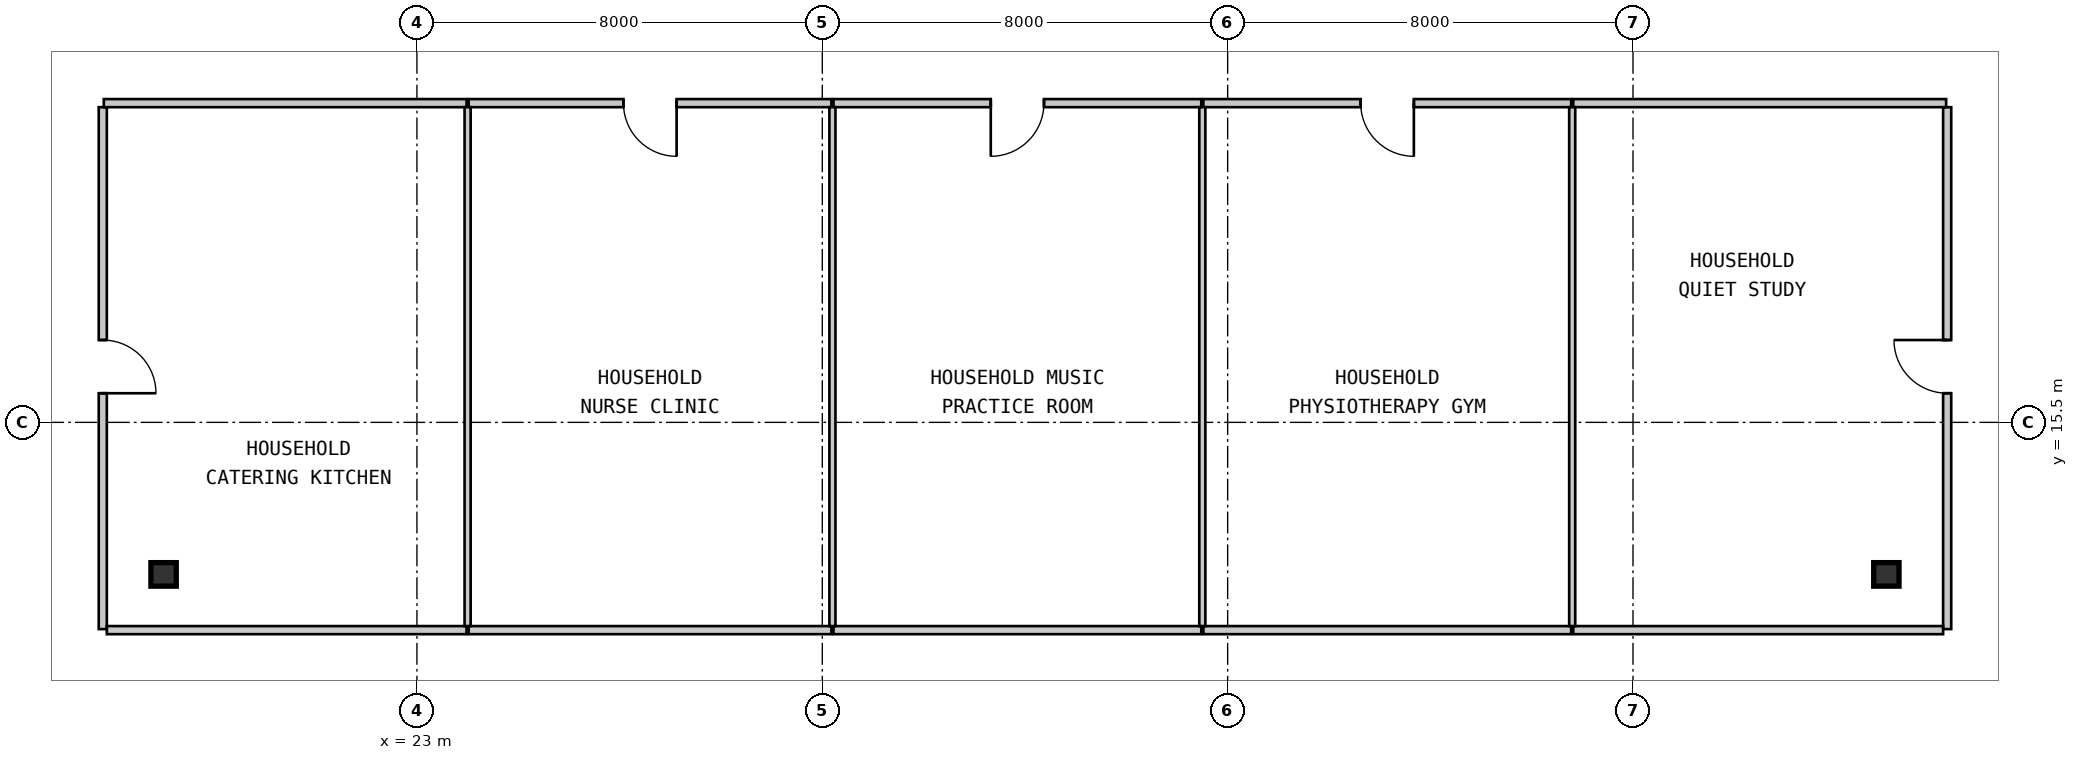
"""IFC4 building model, lengths in metres.
Left out: names, types, materials, properties, quantities, classifications, styles, units other than length and angle.
Written with IfcOpenShell. Run it as: python <this file> out.ifc"""

import sys

from ifc_helpers import new_model, si_unit, direction, frame, frame_2d, origin, origin_2d, place, context, subcontext, project, spatial, rectangle, i_section, extrude, source, transform, mapped, element, fill, save


model = new_model("IFC4")
c1 = context("Model", 3, precision=1e-05, world=origin(), true_north=direction((0.0, 1.0)))
c2 = subcontext(c1, "Body", "Model", "MODEL_VIEW")
j1 = project(units=[si_unit("LENGTHUNIT", "METRE"), si_unit("PLANEANGLEUNIT", "RADIAN")], contexts=[c1])
p1 = place(None, origin())
s1 = spatial("IfcSite", under=j1, at=p1, CompositionType="ELEMENT")
p2 = place(p1, origin())
s2 = spatial("IfcBuilding", under=s1, at=p2, CompositionType="ELEMENT")
p3 = place(p2, frame((0.0, 0.0, 93.45)))
s3 = spatial("IfcBuildingStorey", under=s2, at=p3, CompositionType="ELEMENT", Elevation=93.45)
m1 = source(origin(), c2, "Body", "SweptSolid", [
    extrude(i_section(OverallWidth=0.5, OverallDepth=0.464, WebThickness=0.022, FlangeThickness=0.034, at=origin_2d()), origin(), (0.0, 0.0, 1.0), 3.15),
])
for number, where, z_axis, x_axis in (
    (1, (18.0, 12.5, 0.0), (0.0, 0.0, 1.0), (1.0, 0.0, 0.0)),
    (2, (52.0, 12.5, 0.0), (0.0, 0.0, 1.0), (1.0, 0.0, 0.0)),
):
    element("IfcColumn", number, at=place(p3, frame(where, z_axis=z_axis, x_axis=x_axis)), inside=s3, PredefinedType="COLUMN", context=c2, shape_type="MappedRepresentation", body=[
        mapped(m1, transform((0.0, 0.0, 0.0), scale=1.0)),
    ])
m2 = source(origin(), c2, "Body", "SweptSolid", [
    extrude(rectangle(XDim=10.3, YDim=0.16, at=frame_2d((5.15, 0.0))), origin(), (0.0, 0.0, 1.0), 2.93),
])
p4 = place(p3, frame((16.8, 21.72, 0.0), z_axis=(0.0, 0.0, 1.0), x_axis=(0.0, -1.0, 0.0)))
e3 = element("IfcWall", 3, at=p4, inside=s3, PredefinedType="PARTITIONING", context=c2, shape_type="MappedRepresentation", body=[
    mapped(m2, transform((0.0, 0.0, 0.0), scale=1.0)),
])
m3 = source(origin(), c2, "Body", "SweptSolid", [
    extrude(rectangle(XDim=1.05, YDim=2.1, at=frame_2d((0.525, 1.05))), frame((0.0, 0.09, 0.0), z_axis=(0.0, -1.0, 0.0), x_axis=(1.0, 0.0, 0.0)), (0.0, 0.0, 1.0), 0.18),
])
p5 = place(p4, frame((4.595, 0.0, 0.0)))
e4 = element("IfcOpeningElement", 4, at=p5, cuts=e3, PredefinedType="OPENING", context=c2, shape_type="MappedRepresentation", body=[
    mapped(m3, transform((0.0, 0.0, 0.0), scale=1.0)),
])
m4 = source(origin(), c2, "Body", "SweptSolid", [
    extrude(rectangle(XDim=7.159, YDim=0.16, at=frame_2d((3.58, 0.0))), origin(), (0.0, 0.0, 1.0), 2.93),
])
p6 = place(p3, frame((23.98, 21.8, 0.0), z_axis=(0.0, 0.0, 1.0), x_axis=(-1.0, 0.0, 0.0)))
e5 = element("IfcWall", 5, at=p6, inside=s3, PredefinedType="PARTITIONING", context=c2, shape_type="MappedRepresentation", body=[
    mapped(m4, transform((0.0, 0.0, 0.0), scale=1.0)),
])
p7 = place(p3, frame((31.18, 21.8, 0.0), z_axis=(0.0, 0.0, 1.0), x_axis=(-1.0, 0.0, 0.0)))
e6 = element("IfcWall", 6, at=p7, inside=s3, PredefinedType="PARTITIONING", context=c2, shape_type="MappedRepresentation", body=[
    mapped(m4, transform((0.0, 0.0, 0.0), scale=1.0)),
])
p8 = place(p7, frame((3.055, 0.0, 0.0)))
e7 = element("IfcOpeningElement", 7, at=p8, cuts=e6, PredefinedType="OPENING", context=c2, shape_type="MappedRepresentation", body=[
    mapped(m3, transform((0.0, 0.0, 0.0), scale=1.0)),
])
m5 = source(origin(), c2, "Body", "SweptSolid", [
    extrude(rectangle(XDim=7.26, YDim=0.16, at=frame_2d((3.63, 0.0))), origin(), (0.0, 0.0, 1.0), 2.93),
])
p9 = place(p3, frame((38.48, 21.8, 0.0), z_axis=(0.0, 0.0, 1.0), x_axis=(-1.0, 0.0, 0.0)))
e8 = element("IfcWall", 8, at=p9, inside=s3, PredefinedType="PARTITIONING", context=c2, shape_type="MappedRepresentation", body=[
    mapped(m5, transform((0.0, 0.0, 0.0), scale=1.0)),
])
p10 = place(p9, frame((3.105, 0.0, 0.0)))
e9 = element("IfcOpeningElement", 9, at=p10, cuts=e8, PredefinedType="OPENING", context=c2, shape_type="MappedRepresentation", body=[
    mapped(m3, transform((0.0, 0.0, 0.0), scale=1.0)),
])
p11 = place(p3, frame((45.78, 21.8, 0.0), z_axis=(0.0, 0.0, 1.0), x_axis=(-1.0, 0.0, 0.0)))
e10 = element("IfcWall", 10, at=p11, inside=s3, PredefinedType="PARTITIONING", context=c2, shape_type="MappedRepresentation", body=[
    mapped(m5, transform((0.0, 0.0, 0.0), scale=1.0)),
])
p12 = place(p11, frame((3.105, 0.0, 0.0)))
e11 = element("IfcOpeningElement", 11, at=p12, cuts=e10, PredefinedType="OPENING", context=c2, shape_type="MappedRepresentation", body=[
    mapped(m3, transform((0.0, 0.0, 0.0), scale=1.0)),
])
p13 = place(p3, frame((53.2, 11.42, 0.0), z_axis=(0.0, 0.0, 1.0), x_axis=(0.0, 1.0, 0.0)))
e12 = element("IfcWall", 12, at=p13, inside=s3, PredefinedType="PARTITIONING", context=c2, shape_type="MappedRepresentation", body=[
    mapped(m2, transform((0.0, 0.0, 0.0), scale=1.0)),
])
p14 = place(p13, frame((4.655, 0.0, 0.0)))
e13 = element("IfcOpeningElement", 13, at=p14, cuts=e12, PredefinedType="OPENING", context=c2, shape_type="MappedRepresentation", body=[
    mapped(m3, transform((0.0, 0.0, 0.0), scale=1.0)),
])
m6 = source(origin(), c2, "Body", "SweptSolid", [
    extrude(rectangle(XDim=7.359, YDim=0.16, at=frame_2d((3.68, 0.0))), origin(), (0.0, 0.0, 1.0), 2.93),
])
p15 = place(p3, frame((53.18, 21.8, 0.0), z_axis=(0.0, 0.0, 1.0), x_axis=(-1.0, 0.0, 0.0)))
e14 = element("IfcWall", 14, at=p15, inside=s3, PredefinedType="PARTITIONING", context=c2, shape_type="MappedRepresentation", body=[
    mapped(m6, transform((0.0, 0.0, 0.0), scale=1.0)),
])
m7 = source(origin(), c2, "Body", "SweptSolid", [
    extrude(rectangle(XDim=7.1, YDim=0.16, at=frame_2d((3.55, 0.0))), origin(), (0.0, 0.0, 1.0), 2.93),
])
p16 = place(p3, frame((16.88, 11.4, 0.0), z_axis=(0.0, 0.0, 1.0), x_axis=(1.0, 0.0, 0.0)))
e15 = element("IfcWall", 15, at=p16, inside=s3, PredefinedType="PARTITIONING", context=c2, shape_type="MappedRepresentation", body=[
    mapped(m7, transform((0.0, 0.0, 0.0), scale=1.0)),
])
p17 = place(p3, frame((24.02, 11.4, 0.0), z_axis=(0.0, 0.0, 1.0), x_axis=(1.0, 0.0, 0.0)))
e16 = element("IfcWall", 16, at=p17, inside=s3, PredefinedType="PARTITIONING", context=c2, shape_type="MappedRepresentation", body=[
    mapped(m4, transform((0.0, 0.0, 0.0), scale=1.0)),
])
for number, where, z_axis, x_axis in (
    (17, (31.22, 11.4, 0.0), (0.0, 0.0, 1.0), (1.0, 0.0, 0.0)),
    (18, (38.52, 11.4, 0.0), (0.0, 0.0, 1.0), (1.0, 0.0, 0.0)),
):
    element("IfcWall", number, at=place(p3, frame(where, z_axis=z_axis, x_axis=x_axis)), inside=s3, PredefinedType="PARTITIONING", context=c2, shape_type="MappedRepresentation", body=[
        mapped(m5, transform((0.0, 0.0, 0.0), scale=1.0)),
    ])
m8 = source(origin(), c2, "Body", "SweptSolid", [
    extrude(rectangle(XDim=7.3, YDim=0.16, at=frame_2d((3.65, 0.0))), origin(), (0.0, 0.0, 1.0), 2.93),
])
p18 = place(p3, frame((45.82, 11.4, 0.0), z_axis=(0.0, 0.0, 1.0), x_axis=(1.0, 0.0, 0.0)))
e19 = element("IfcWall", 19, at=p18, inside=s3, PredefinedType="PARTITIONING", context=c2, shape_type="MappedRepresentation", body=[
    mapped(m8, transform((0.0, 0.0, 0.0), scale=1.0)),
])
m9 = source(origin(), c2, "Body", "SweptSolid", [
    extrude(rectangle(XDim=10.24, YDim=0.12, at=frame_2d((5.12, 0.0))), origin(), (0.0, 0.0, 1.0), 2.93),
])
for number, where, z_axis, x_axis in (
    (20, (24.0, 21.72, 0.0), (0.0, 0.0, 1.0), (0.0, -1.0, 0.0)),
    (21, (31.2, 21.72, 0.0), (0.0, 0.0, 1.0), (0.0, -1.0, 0.0)),
    (22, (38.5, 21.72, 0.0), (0.0, 0.0, 1.0), (0.0, -1.0, 0.0)),
    (23, (45.8, 21.72, 0.0), (0.0, 0.0, 1.0), (0.0, -1.0, 0.0)),
):
    element("IfcWall", number, at=place(p3, frame(where, z_axis=z_axis, x_axis=x_axis)), inside=s3, PredefinedType="PARTITIONING", context=c2, shape_type="MappedRepresentation", body=[
        mapped(m9, transform((0.0, 0.0, 0.0), scale=1.0)),
    ])
m10 = source(origin(), c2, "Body", "SweptSolid", [
    extrude(rectangle(XDim=1.05, YDim=2.1, at=frame_2d((0.525, 1.05))), frame((0.0, 0.025, 0.0), z_axis=(0.0, -1.0, 0.0), x_axis=(1.0, 0.0, 0.0)), (0.0, 0.0, 1.0), 0.05),
])
p19 = place(p5, origin())
e24 = element("IfcDoor", 24, at=p19, inside=s3, OperationType="SINGLE_SWING_RIGHT", PredefinedType="DOOR", context=c2, shape_type="MappedRepresentation", body=[
    mapped(m10, transform((0.0, 0.0, 0.0), scale=1.0)),
])
fill(e4, e24)
p20 = place(p8, origin())
e25 = element("IfcDoor", 25, at=p20, inside=s3, OperationType="SINGLE_SWING_LEFT", PredefinedType="DOOR", context=c2, shape_type="MappedRepresentation", body=[
    mapped(m10, transform((0.0, 0.0, 0.0), scale=1.0)),
])
fill(e7, e25)
p21 = place(p10, origin())
e26 = element("IfcDoor", 26, at=p21, inside=s3, OperationType="SINGLE_SWING_RIGHT", PredefinedType="DOOR", context=c2, shape_type="MappedRepresentation", body=[
    mapped(m10, transform((0.0, 0.0, 0.0), scale=1.0)),
])
fill(e9, e26)
p22 = place(p12, origin())
e27 = element("IfcDoor", 27, at=p22, inside=s3, OperationType="SINGLE_SWING_LEFT", PredefinedType="DOOR", context=c2, shape_type="MappedRepresentation", body=[
    mapped(m10, transform((0.0, 0.0, 0.0), scale=1.0)),
])
fill(e11, e27)
p23 = place(p14, origin())
e28 = element("IfcDoor", 28, at=p23, inside=s3, OperationType="SINGLE_SWING_RIGHT", PredefinedType="DOOR", context=c2, shape_type="MappedRepresentation", body=[
    mapped(m10, transform((0.0, 0.0, 0.0), scale=1.0)),
])
fill(e13, e28)
save(model, sys.argv[1])
